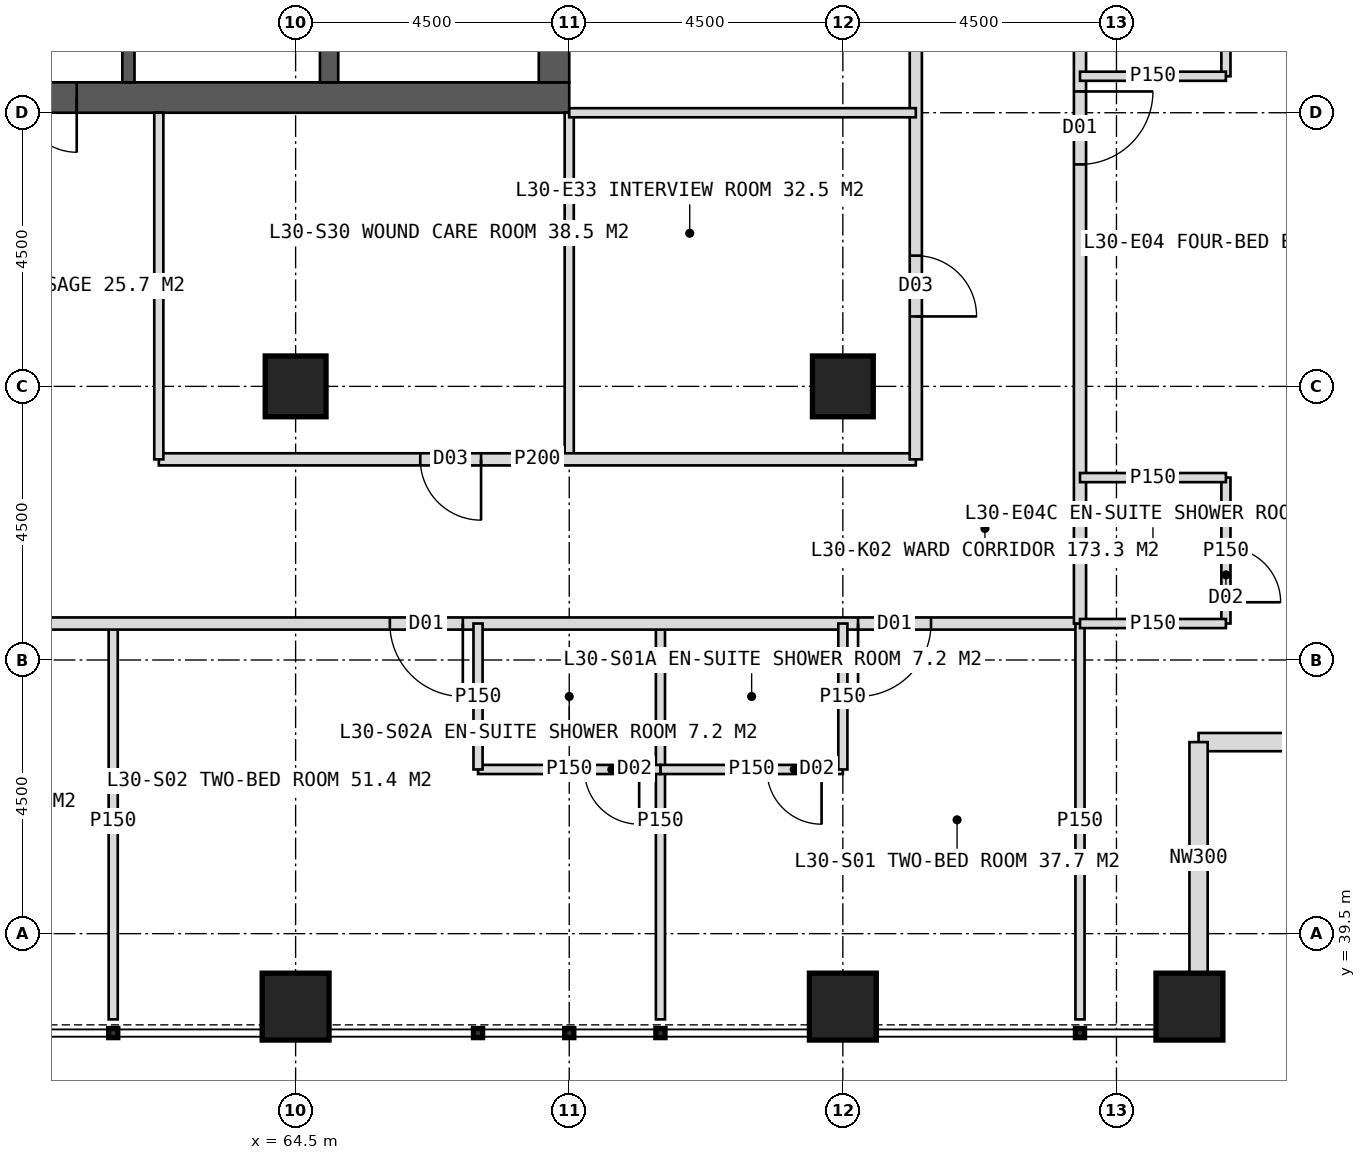
"""IFC4 building model, lengths in metres.
Left out: names, types, materials, properties, quantities, classifications, styles, units other than length and angle.
Written with IfcOpenShell. Run it as: python <this file> out.ifc"""

import sys

from ifc_helpers import new_model, si_unit, direction, frame, frame_2d, origin, origin_2d, place, context, subcontext, project, spatial, rectangle, hollow_rectangle, extrude, element, fill, save


model = new_model("IFC4")
c1 = context("Model", 3, precision=1e-05, world=origin(), true_north=direction((0.0, 1.0)))
c2 = subcontext(c1, "Body", "Model", "MODEL_VIEW")
j1 = project(units=[si_unit("LENGTHUNIT", "METRE"), si_unit("PLANEANGLEUNIT", "RADIAN")], contexts=[c1])
p1 = place(None, origin())
s1 = spatial("IfcSite", under=j1, at=p1, CompositionType="ELEMENT")
p2 = place(p1, origin())
s2 = spatial("IfcBuilding", under=s1, at=p2, CompositionType="ELEMENT")
p3 = place(p2, frame((0.0, 0.0, 128.0)))
s3 = spatial("IfcBuildingStorey", under=s2, at=p3, CompositionType="ELEMENT", Elevation=128.0)
p4 = place(p3, frame((51.0, 53.25, 0.0), z_axis=(0.0, 0.0, 1.0), x_axis=(1.0, 0.0, 0.0)))
e1 = element("IfcWall", 1, at=p4, inside=s3, PredefinedType="SHEAR", context=c2, shape_type="SweptSolid", body=[
    extrude(rectangle(XDim=18.0, YDim=0.5, at=frame_2d((9.0, 0.0))), origin(), (0.0, 0.0, 1.0), 4.0),
])
p5 = place(p4, frame((8.1, 0.0, 0.0)))
e2 = element("IfcOpeningElement", 2, at=p5, cuts=e1, PredefinedType="OPENING", context=c2, shape_type="SweptSolid", body=[
    extrude(rectangle(XDim=1.8, YDim=2.2, at=frame_2d((0.9, 1.1))), frame((0.0, 0.26, 0.0), z_axis=(0.0, -1.0, 0.0), x_axis=(1.0, 0.0, 0.0)), (0.0, 0.0, 1.0), 0.52),
])
p6 = place(p3, frame((68.75, 53.5, 0.0), z_axis=(0.0, 0.0, 1.0), x_axis=(0.0, 1.0, 0.0)))
e3 = element("IfcWall", 3, at=p6, inside=s3, PredefinedType="SHEAR", context=c2, shape_type="SweptSolid", body=[
    extrude(rectangle(XDim=17.0, YDim=0.5, at=frame_2d((8.5, 0.0))), origin(), (0.0, 0.0, 1.0), 4.0),
])
p7 = place(p6, frame((9.5, 0.0, 0.0)))
e4 = element("IfcOpeningElement", 4, at=p7, cuts=e3, PredefinedType="OPENING", context=c2, shape_type="SweptSolid", body=[
    extrude(rectangle(XDim=1.5, YDim=2.2, at=frame_2d((0.75, 1.1))), frame((0.0, 0.26, 0.0), z_axis=(0.0, -1.0, 0.0), x_axis=(1.0, 0.0, 0.0)), (0.0, 0.0, 1.0), 0.52),
])
p8 = place(p3, frame((65.05, 53.5, 0.0), z_axis=(0.0, 0.0, 1.0), x_axis=(0.0, 1.0, 0.0)))
e5 = element("IfcWall", 5, at=p8, inside=s3, PredefinedType="SHEAR", context=c2, shape_type="SweptSolid", body=[
    extrude(rectangle(XDim=17.0, YDim=0.3, at=frame_2d((8.5, 0.0))), origin(), (0.0, 0.0, 1.0), 4.0),
])
p9 = place(p3, frame((61.75, 53.5, 0.0), z_axis=(0.0, 0.0, 1.0), x_axis=(0.0, 1.0, 0.0)))
e6 = element("IfcWall", 6, at=p9, inside=s3, PredefinedType="SHEAR", context=c2, shape_type="SweptSolid", body=[
    extrude(rectangle(XDim=17.0, YDim=0.2, at=frame_2d((8.5, 0.0))), origin(), (0.0, 0.0, 1.0), 4.0),
])
p10 = place(p9, frame((1.375, 0.0, 0.0)))
e7 = element("IfcOpeningElement", 7, at=p10, cuts=e6, PredefinedType="OPENING", context=c2, shape_type="SweptSolid", body=[
    extrude(rectangle(XDim=1.4, YDim=2.2, at=frame_2d((0.7, 1.1))), frame((0.0, 0.11, 0.0), z_axis=(0.0, -1.0, 0.0), x_axis=(1.0, 0.0, 0.0)), (0.0, 0.0, 1.0), 0.22),
])
p11 = place(p9, frame((5.675, 0.0, 0.0)))
e8 = element("IfcOpeningElement", 8, at=p11, cuts=e6, PredefinedType="OPENING", context=c2, shape_type="SweptSolid", body=[
    extrude(rectangle(XDim=1.4, YDim=2.2, at=frame_2d((0.7, 1.1))), frame((0.0, 0.11, 0.0), z_axis=(0.0, -1.0, 0.0), x_axis=(1.0, 0.0, 0.0)), (0.0, 0.0, 1.0), 0.22),
])
for number, where, z_axis, x_axis in (
    (9, (73.5, 48.5, 0.0), (0.0, 0.0, 1.0), (1.0, 0.0, 0.0)),
    (10, (64.5, 48.5, 0.0), (0.0, 0.0, 1.0), (1.0, 0.0, 0.0)),
):
    element("IfcColumn", number, at=place(p3, frame(where, z_axis=z_axis, x_axis=x_axis)), inside=s3, PredefinedType="COLUMN", context=c2, shape_type="SweptSolid", body=[
        extrude(hollow_rectangle(XDim=1.0, YDim=1.0, WallThickness=0.1, at=origin_2d()), origin(), (0.0, 0.0, 1.0), 4.0),
    ])
for number, where, z_axis, x_axis in (
    (11, (64.5, 38.3, 0.0), (0.0, 0.0, 1.0), (1.0, 0.0, 0.0)),
    (12, (73.5, 38.3, 0.0), (0.0, 0.0, 1.0), (1.0, 0.0, 0.0)),
    (13, (79.2, 38.3, 0.0), (0.0, 0.0, 1.0), (1.0, 0.0, 0.0)),
):
    element("IfcColumn", number, at=place(p3, frame(where, z_axis=z_axis, x_axis=x_axis)), inside=s3, PredefinedType="COLUMN", context=c2, shape_type="SweptSolid", body=[
        extrude(hollow_rectangle(XDim=1.1, YDim=1.1, WallThickness=0.1, at=origin_2d()), origin(), (0.0, 0.0, 1.0), 4.0),
    ])
for number, where, z_axis, x_axis in (
    (14, (83.15, 42.65, 0.0), (0.0, 0.0, 1.0), (-1.0, 0.0, 0.0)),
    (15, (79.35, 42.65, 0.0), (0.0, 0.0, 1.0), (0.0, -1.0, 0.0)),
):
    element("IfcWall", number, at=place(p3, frame(where, z_axis=z_axis, x_axis=x_axis)), inside=s3, PredefinedType="ELEMENTEDWALL", context=c2, shape_type="SweptSolid", body=[
        extrude(rectangle(XDim=3.8, YDim=0.3, at=frame_2d((1.9, 0.0))), origin(), (0.0, 0.0, 1.0), 4.0),
    ])
for number, where, z_axis, x_axis in (
    (16, (70.5, 44.6, 0.0), (0.0, 0.0, 1.0), (0.0, -1.0, 0.0)),
    (17, (61.5, 44.6, 0.0), (0.0, 0.0, 1.0), (0.0, -1.0, 0.0)),
):
    element("IfcWall", number, at=place(p3, frame(where, z_axis=z_axis, x_axis=x_axis)), inside=s3, PredefinedType="PARTITIONING", context=c2, shape_type="SweptSolid", body=[
        extrude(rectangle(XDim=6.51, YDim=0.15, at=frame_2d((3.255, 0.0))), origin(), (0.0, 0.0, 1.0), 3.75),
    ])
p12 = place(p3, frame((77.4, 44.6, 0.0), z_axis=(0.0, 0.0, 1.0), x_axis=(-1.0, 0.0, 0.0)))
e18 = element("IfcWall", 18, at=p12, inside=s3, PredefinedType="PARTITIONING", context=c2, shape_type="SweptSolid", body=[
    extrude(rectangle(XDim=34.8, YDim=0.2, at=frame_2d((17.4, 0.0))), origin(), (0.0, 0.0, 1.0), 3.75),
])
p13 = place(p12, frame((2.45, 0.0, 0.0)))
e19 = element("IfcOpeningElement", 19, at=p13, cuts=e18, PredefinedType="OPENING", context=c2, shape_type="SweptSolid", body=[
    extrude(rectangle(XDim=1.2, YDim=2.2, at=frame_2d((0.6, 1.1))), frame((0.0, 0.11, 0.0), z_axis=(0.0, -1.0, 0.0), x_axis=(1.0, 0.0, 0.0)), (0.0, 0.0, 1.0), 0.22),
])
p14 = place(p12, frame((10.15, 0.0, 0.0)))
e20 = element("IfcOpeningElement", 20, at=p14, cuts=e18, PredefinedType="OPENING", context=c2, shape_type="SweptSolid", body=[
    extrude(rectangle(XDim=1.2, YDim=2.2, at=frame_2d((0.6, 1.1))), frame((0.0, 0.11, 0.0), z_axis=(0.0, -1.0, 0.0), x_axis=(1.0, 0.0, 0.0)), (0.0, 0.0, 1.0), 0.22),
])
p15 = place(p12, frame((20.45, 0.0, 0.0)))
e21 = element("IfcOpeningElement", 21, at=p15, cuts=e18, PredefinedType="OPENING", context=c2, shape_type="SweptSolid", body=[
    extrude(rectangle(XDim=1.2, YDim=2.2, at=frame_2d((0.6, 1.1))), frame((0.0, 0.11, 0.0), z_axis=(0.0, -1.0, 0.0), x_axis=(1.0, 0.0, 0.0)), (0.0, 0.0, 1.0), 0.22),
])
p16 = place(p12, frame((27.55, 0.0, 0.0)))
e22 = element("IfcOpeningElement", 22, at=p16, cuts=e18, PredefinedType="OPENING", context=c2, shape_type="SweptSolid", body=[
    extrude(rectangle(XDim=1.2, YDim=2.2, at=frame_2d((0.6, 1.1))), frame((0.0, 0.11, 0.0), z_axis=(0.0, -1.0, 0.0), x_axis=(1.0, 0.0, 0.0)), (0.0, 0.0, 1.0), 0.22),
])
p17 = place(p3, frame((77.4, 44.6, 0.0), z_axis=(0.0, 0.0, 1.0), x_axis=(0.0, -1.0, 0.0)))
e23 = element("IfcWall", 23, at=p17, inside=s3, PredefinedType="PARTITIONING", context=c2, shape_type="SweptSolid", body=[
    extrude(rectangle(XDim=6.51, YDim=0.15, at=frame_2d((3.255, 0.0))), origin(), (0.0, 0.0, 1.0), 3.75),
])
p18 = place(p3, frame((73.5, 42.2, 0.0), z_axis=(0.0, 0.0, 1.0), x_axis=(-1.0, 0.0, 0.0)))
e24 = element("IfcWall", 24, at=p18, inside=s3, PredefinedType="PARTITIONING", context=c2, shape_type="SweptSolid", body=[
    extrude(rectangle(XDim=3.0, YDim=0.15, at=frame_2d((1.5, 0.0))), origin(), (0.0, 0.0, 1.0), 3.75),
])
p19 = place(p18, frame((0.35, 0.0, 0.0)))
e25 = element("IfcOpeningElement", 25, at=p19, cuts=e24, PredefinedType="OPENING", context=c2, shape_type="SweptSolid", body=[
    extrude(rectangle(XDim=0.9, YDim=2.1, at=frame_2d((0.45, 1.05))), frame((0.0, 0.085, 0.0), z_axis=(0.0, -1.0, 0.0), x_axis=(1.0, 0.0, 0.0)), (0.0, 0.0, 1.0), 0.17),
])
p20 = place(p3, frame((73.5, 44.6, 0.0), z_axis=(0.0, 0.0, 1.0), x_axis=(0.0, -1.0, 0.0)))
e26 = element("IfcWall", 26, at=p20, inside=s3, PredefinedType="PARTITIONING", context=c2, shape_type="SweptSolid", body=[
    extrude(rectangle(XDim=2.4, YDim=0.15, at=frame_2d((1.2, 0.0))), origin(), (0.0, 0.0, 1.0), 2.95),
])
p21 = place(p3, frame((70.5, 42.2, 0.0), z_axis=(0.0, 0.0, 1.0), x_axis=(-1.0, 0.0, 0.0)))
e27 = element("IfcWall", 27, at=p21, inside=s3, PredefinedType="PARTITIONING", context=c2, shape_type="SweptSolid", body=[
    extrude(rectangle(XDim=3.0, YDim=0.15, at=frame_2d((1.5, 0.0))), origin(), (0.0, 0.0, 1.0), 3.75),
])
p22 = place(p21, frame((0.35, 0.0, 0.0)))
e28 = element("IfcOpeningElement", 28, at=p22, cuts=e27, PredefinedType="OPENING", context=c2, shape_type="SweptSolid", body=[
    extrude(rectangle(XDim=0.9, YDim=2.1, at=frame_2d((0.45, 1.05))), frame((0.0, 0.085, 0.0), z_axis=(0.0, -1.0, 0.0), x_axis=(1.0, 0.0, 0.0)), (0.0, 0.0, 1.0), 0.17),
])
p23 = place(p3, frame((67.5, 44.6, 0.0), z_axis=(0.0, 0.0, 1.0), x_axis=(0.0, -1.0, 0.0)))
e29 = element("IfcWall", 29, at=p23, inside=s3, PredefinedType="PARTITIONING", context=c2, shape_type="SweptSolid", body=[
    extrude(rectangle(XDim=2.4, YDim=0.15, at=frame_2d((1.2, 0.0))), origin(), (0.0, 0.0, 1.0), 3.75),
])
p24 = place(p3, frame((69.0, 53.0, 0.0), z_axis=(0.0, 0.0, 1.0), x_axis=(0.0, -1.0, 0.0)))
e30 = element("IfcWall", 30, at=p24, inside=s3, PredefinedType="PARTITIONING", context=c2, shape_type="SweptSolid", body=[
    extrude(rectangle(XDim=5.7, YDim=0.15, at=frame_2d((2.85, 0.0))), origin(), (0.0, 0.0, 1.0), 3.75),
])
p25 = place(p3, frame((74.7, 47.3, 0.0), z_axis=(0.0, 0.0, 1.0), x_axis=(-1.0, 0.0, 0.0)))
e31 = element("IfcWall", 31, at=p25, inside=s3, PredefinedType="PARTITIONING", context=c2, shape_type="SweptSolid", body=[
    extrude(rectangle(XDim=12.45, YDim=0.2, at=frame_2d((6.225, 0.0))), origin(), (0.0, 0.0, 1.0), 3.75),
])
p26 = place(p25, frame((7.15, 0.0, 0.0)))
e32 = element("IfcOpeningElement", 32, at=p26, cuts=e31, PredefinedType="OPENING", context=c2, shape_type="SweptSolid", body=[
    extrude(rectangle(XDim=1.0, YDim=2.1, at=frame_2d((0.5, 1.05))), frame((0.0, 0.11, 0.0), z_axis=(0.0, -1.0, 0.0), x_axis=(1.0, 0.0, 0.0)), (0.0, 0.0, 1.0), 0.22),
])
p27 = place(p3, frame((62.25, 53.0, 0.0), z_axis=(0.0, 0.0, 1.0), x_axis=(0.0, -1.0, 0.0)))
e33 = element("IfcWall", 33, at=p27, inside=s3, PredefinedType="PARTITIONING", context=c2, shape_type="SweptSolid", body=[
    extrude(rectangle(XDim=5.7, YDim=0.15, at=frame_2d((2.85, 0.0))), origin(), (0.0, 0.0, 1.0), 3.75),
])
p28 = place(p3, frame((77.4, 79.4, 0.0), z_axis=(0.0, 0.0, 1.0), x_axis=(0.0, -1.0, 0.0)))
e34 = element("IfcWall", 34, at=p28, inside=s3, PredefinedType="PARTITIONING", context=c2, shape_type="SweptSolid", body=[
    extrude(rectangle(XDim=34.8, YDim=0.2, at=frame_2d((17.4, 0.0))), origin(), (0.0, 0.0, 1.0), 3.75),
])
p29 = place(p28, frame((2.45, 0.0, 0.0)))
e35 = element("IfcOpeningElement", 35, at=p29, cuts=e34, PredefinedType="OPENING", context=c2, shape_type="SweptSolid", body=[
    extrude(rectangle(XDim=1.2, YDim=2.2, at=frame_2d((0.6, 1.1))), frame((0.0, 0.11, 0.0), z_axis=(0.0, -1.0, 0.0), x_axis=(1.0, 0.0, 0.0)), (0.0, 0.0, 1.0), 0.22),
])
p30 = place(p28, frame((10.15, 0.0, 0.0)))
e36 = element("IfcOpeningElement", 36, at=p30, cuts=e34, PredefinedType="OPENING", context=c2, shape_type="SweptSolid", body=[
    extrude(rectangle(XDim=1.2, YDim=2.2, at=frame_2d((0.6, 1.1))), frame((0.0, 0.11, 0.0), z_axis=(0.0, -1.0, 0.0), x_axis=(1.0, 0.0, 0.0)), (0.0, 0.0, 1.0), 0.22),
])
p31 = place(p28, frame((19.55, 0.0, 0.0)))
e37 = element("IfcOpeningElement", 37, at=p31, cuts=e34, PredefinedType="OPENING", context=c2, shape_type="SweptSolid", body=[
    extrude(rectangle(XDim=1.2, YDim=2.2, at=frame_2d((0.6, 1.1))), frame((0.0, 0.11, 0.0), z_axis=(0.0, -1.0, 0.0), x_axis=(1.0, 0.0, 0.0)), (0.0, 0.0, 1.0), 0.22),
])
p32 = place(p28, frame((26.05, 0.0, 0.0)))
e38 = element("IfcOpeningElement", 38, at=p32, cuts=e34, PredefinedType="OPENING", context=c2, shape_type="SweptSolid", body=[
    extrude(rectangle(XDim=1.2, YDim=2.2, at=frame_2d((0.6, 1.1))), frame((0.0, 0.11, 0.0), z_axis=(0.0, -1.0, 0.0), x_axis=(1.0, 0.0, 0.0)), (0.0, 0.0, 1.0), 0.22),
])
p33 = place(p3, frame((79.8, 56.0, 0.0), z_axis=(0.0, 0.0, 1.0), x_axis=(0.0, -1.0, 0.0)))
e39 = element("IfcWall", 39, at=p33, inside=s3, PredefinedType="PARTITIONING", context=c2, shape_type="SweptSolid", body=[
    extrude(rectangle(XDim=2.4, YDim=0.15, at=frame_2d((1.2, 0.0))), origin(), (0.0, 0.0, 1.0), 3.75),
])
p34 = place(p33, frame((0.35, 0.0, 0.0)))
e40 = element("IfcOpeningElement", 40, at=p34, cuts=e39, PredefinedType="OPENING", context=c2, shape_type="SweptSolid", body=[
    extrude(rectangle(XDim=0.9, YDim=2.1, at=frame_2d((0.45, 1.05))), frame((0.0, 0.085, 0.0), z_axis=(0.0, -1.0, 0.0), x_axis=(1.0, 0.0, 0.0)), (0.0, 0.0, 1.0), 0.17),
])
p35 = place(p3, frame((77.4, 53.6, 0.0), z_axis=(0.0, 0.0, 1.0), x_axis=(1.0, 0.0, 0.0)))
e41 = element("IfcWall", 41, at=p35, inside=s3, PredefinedType="PARTITIONING", context=c2, shape_type="SweptSolid", body=[
    extrude(rectangle(XDim=2.4, YDim=0.15, at=frame_2d((1.2, 0.0))), origin(), (0.0, 0.0, 1.0), 3.75),
])
p36 = place(p3, frame((79.8, 47.0, 0.0), z_axis=(0.0, 0.0, 1.0), x_axis=(0.0, -1.0, 0.0)))
e42 = element("IfcWall", 42, at=p36, inside=s3, PredefinedType="PARTITIONING", context=c2, shape_type="SweptSolid", body=[
    extrude(rectangle(XDim=2.4, YDim=0.15, at=frame_2d((1.2, 0.0))), origin(), (0.0, 0.0, 1.0), 3.75),
])
p37 = place(p36, frame((1.15, 0.0, 0.0)))
e43 = element("IfcOpeningElement", 43, at=p37, cuts=e42, PredefinedType="OPENING", context=c2, shape_type="SweptSolid", body=[
    extrude(rectangle(XDim=0.9, YDim=2.1, at=frame_2d((0.45, 1.05))), frame((0.0, 0.085, 0.0), z_axis=(0.0, -1.0, 0.0), x_axis=(1.0, 0.0, 0.0)), (0.0, 0.0, 1.0), 0.17),
])
for number, where, z_axis, x_axis in (
    (44, (77.4, 47.0, 0.0), (0.0, 0.0, 1.0), (1.0, 0.0, 0.0)),
    (45, (77.4, 44.6, 0.0), (0.0, 0.0, 1.0), (1.0, 0.0, 0.0)),
):
    element("IfcWall", number, at=place(p3, frame(where, z_axis=z_axis, x_axis=x_axis)), inside=s3, PredefinedType="PARTITIONING", context=c2, shape_type="SweptSolid", body=[
        extrude(rectangle(XDim=2.4, YDim=0.15, at=frame_2d((1.2, 0.0))), origin(), (0.0, 0.0, 1.0), 3.75),
    ])
p38 = place(p3, frame((74.7, 62.0, 0.0), z_axis=(0.0, 0.0, 1.0), x_axis=(0.0, -1.0, 0.0)))
e46 = element("IfcWall", 46, at=p38, inside=s3, PredefinedType="PARTITIONING", context=c2, shape_type="SweptSolid", body=[
    extrude(rectangle(XDim=14.7, YDim=0.2, at=frame_2d((7.35, 0.0))), origin(), (0.0, 0.0, 1.0), 3.75),
])
p39 = place(p38, frame((1.45, 0.0, 0.0)))
e47 = element("IfcOpeningElement", 47, at=p39, cuts=e46, PredefinedType="OPENING", context=c2, shape_type="SweptSolid", body=[
    extrude(rectangle(XDim=1.0, YDim=2.1, at=frame_2d((0.5, 1.05))), frame((0.0, 0.11, 0.0), z_axis=(0.0, -1.0, 0.0), x_axis=(1.0, 0.0, 0.0)), (0.0, 0.0, 1.0), 0.22),
])
p40 = place(p38, frame((11.35, 0.0, 0.0)))
e48 = element("IfcOpeningElement", 48, at=p40, cuts=e46, PredefinedType="OPENING", context=c2, shape_type="SweptSolid", body=[
    extrude(rectangle(XDim=1.0, YDim=2.1, at=frame_2d((0.5, 1.05))), frame((0.0, 0.11, 0.0), z_axis=(0.0, -1.0, 0.0), x_axis=(1.0, 0.0, 0.0)), (0.0, 0.0, 1.0), 0.22),
])
p41 = place(p3, frame((69.0, 53.0, 0.0), z_axis=(0.0, 0.0, 1.0), x_axis=(1.0, 0.0, 0.0)))
e49 = element("IfcWall", 49, at=p41, inside=s3, PredefinedType="PARTITIONING", context=c2, shape_type="SweptSolid", body=[
    extrude(rectangle(XDim=5.7, YDim=0.15, at=frame_2d((2.85, 0.0))), origin(), (0.0, 0.0, 1.0), 3.75),
])
p42 = place(p13, origin())
e50 = element("IfcDoor", 50, at=p42, inside=s3, OperationType="SINGLE_SWING_RIGHT", PredefinedType="DOOR", context=c2, shape_type="SweptSolid", body=[
    extrude(rectangle(XDim=1.2, YDim=2.2, at=frame_2d((0.6, 1.1))), frame((0.0, 0.025, 0.0), z_axis=(0.0, -1.0, 0.0), x_axis=(1.0, 0.0, 0.0)), (0.0, 0.0, 1.0), 0.05),
])
fill(e19, e50)
p43 = place(p19, origin())
e51 = element("IfcDoor", 51, at=p43, inside=s3, OperationType="SINGLE_SWING_LEFT", PredefinedType="DOOR", context=c2, shape_type="SweptSolid", body=[
    extrude(rectangle(XDim=0.9, YDim=2.1, at=frame_2d((0.45, 1.05))), frame((0.0, 0.025, 0.0), z_axis=(0.0, -1.0, 0.0), x_axis=(1.0, 0.0, 0.0)), (0.0, 0.0, 1.0), 0.05),
])
fill(e25, e51)
p44 = place(p14, origin())
e52 = element("IfcDoor", 52, at=p44, inside=s3, OperationType="SINGLE_SWING_LEFT", PredefinedType="DOOR", context=c2, shape_type="SweptSolid", body=[
    extrude(rectangle(XDim=1.2, YDim=2.2, at=frame_2d((0.6, 1.1))), frame((0.0, 0.025, 0.0), z_axis=(0.0, -1.0, 0.0), x_axis=(1.0, 0.0, 0.0)), (0.0, 0.0, 1.0), 0.05),
])
fill(e20, e52)
p45 = place(p22, origin())
e53 = element("IfcDoor", 53, at=p45, inside=s3, OperationType="SINGLE_SWING_LEFT", PredefinedType="DOOR", context=c2, shape_type="SweptSolid", body=[
    extrude(rectangle(XDim=0.9, YDim=2.1, at=frame_2d((0.45, 1.05))), frame((0.0, 0.025, 0.0), z_axis=(0.0, -1.0, 0.0), x_axis=(1.0, 0.0, 0.0)), (0.0, 0.0, 1.0), 0.05),
])
fill(e28, e53)
p46 = place(p26, origin())
e54 = element("IfcDoor", 54, at=p46, inside=s3, OperationType="SINGLE_SWING_LEFT", PredefinedType="DOOR", context=c2, shape_type="SweptSolid", body=[
    extrude(rectangle(XDim=1.0, YDim=2.1, at=frame_2d((0.5, 1.05))), frame((0.0, 0.025, 0.0), z_axis=(0.0, -1.0, 0.0), x_axis=(1.0, 0.0, 0.0)), (0.0, 0.0, 1.0), 0.05),
])
fill(e32, e54)
p47 = place(p32, origin())
e55 = element("IfcDoor", 55, at=p47, inside=s3, OperationType="SINGLE_SWING_LEFT", PredefinedType="DOOR", context=c2, shape_type="SweptSolid", body=[
    extrude(rectangle(XDim=1.2, YDim=2.2, at=frame_2d((0.6, 1.1))), frame((0.0, 0.025, 0.0), z_axis=(0.0, -1.0, 0.0), x_axis=(1.0, 0.0, 0.0)), (0.0, 0.0, 1.0), 0.05),
])
fill(e38, e55)
p48 = place(p37, origin())
e56 = element("IfcDoor", 56, at=p48, inside=s3, OperationType="SINGLE_SWING_RIGHT", PredefinedType="DOOR", context=c2, shape_type="SweptSolid", body=[
    extrude(rectangle(XDim=0.9, YDim=2.1, at=frame_2d((0.45, 1.05))), frame((0.0, 0.025, 0.0), z_axis=(0.0, -1.0, 0.0), x_axis=(1.0, 0.0, 0.0)), (0.0, 0.0, 1.0), 0.05),
])
fill(e43, e56)
p49 = place(p40, origin())
e57 = element("IfcDoor", 57, at=p49, inside=s3, OperationType="SINGLE_SWING_RIGHT", PredefinedType="DOOR", context=c2, shape_type="SweptSolid", body=[
    extrude(rectangle(XDim=1.0, YDim=2.1, at=frame_2d((0.5, 1.05))), frame((0.0, 0.025, 0.0), z_axis=(0.0, -1.0, 0.0), x_axis=(1.0, 0.0, 0.0)), (0.0, 0.0, 1.0), 0.05),
])
fill(e48, e57)
p50 = place(p5, origin())
e58 = element("IfcDoor", 58, at=p50, inside=s3, OperationType="DOUBLE_DOOR_SINGLE_SWING", PredefinedType="DOOR", context=c2, shape_type="SweptSolid", body=[
    extrude(rectangle(XDim=1.8, YDim=2.2, at=frame_2d((0.9, 1.1))), frame((0.0, 0.025, 0.0), z_axis=(0.0, -1.0, 0.0), x_axis=(1.0, 0.0, 0.0)), (0.0, 0.0, 1.0), 0.05),
])
fill(e2, e58)
save(model, sys.argv[1])
